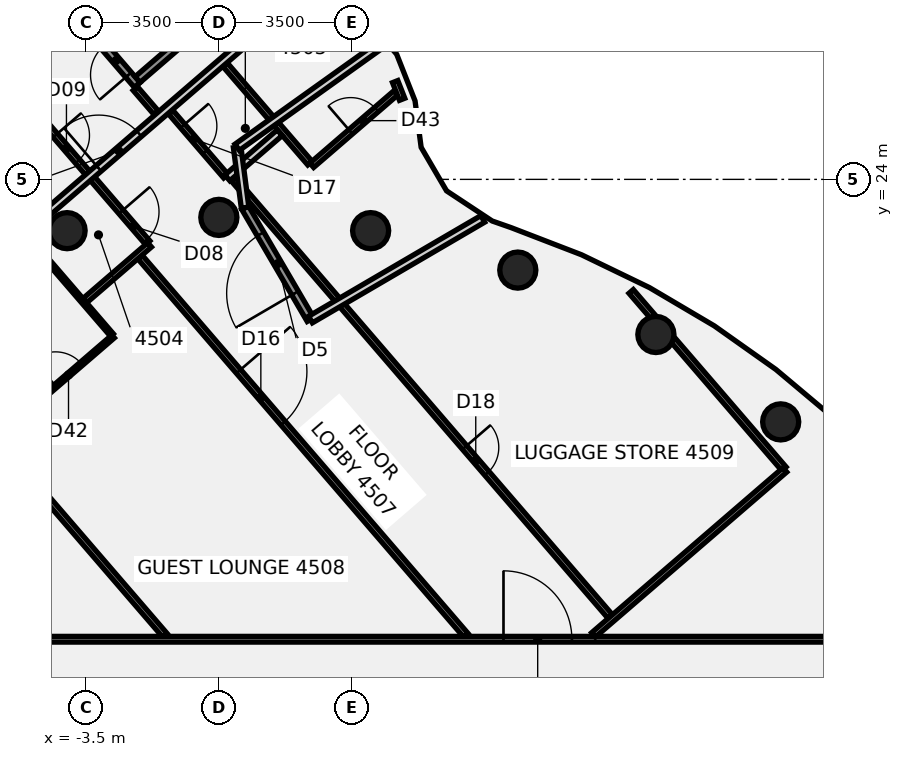
"""IFC4 building model, lengths in metres.
Left out: names, types, materials, properties, quantities, classifications, styles, units other than length and angle.
Written with IfcOpenShell. Run it as: python <this file> out.ifc"""

import sys

from ifc_helpers import new_model, si_unit, direction, frame, frame_2d, origin, origin_2d, place, context, subcontext, project, spatial, rectangle, circle, extrude, element, fill, save


model = new_model("IFC4")
c1 = context("Model", 3, precision=1e-05, world=origin(), true_north=direction((0.0, 1.0)))
c2 = subcontext(c1, "Body", "Model", "MODEL_VIEW")
j1 = project(units=[si_unit("LENGTHUNIT", "METRE"), si_unit("PLANEANGLEUNIT", "RADIAN")], contexts=[c1])
p1 = place(None, origin())
s1 = spatial("IfcSite", under=j1, at=p1, CompositionType="ELEMENT")
p2 = place(p1, origin())
s2 = spatial("IfcBuilding", under=s1, at=p2, CompositionType="ELEMENT")
p3 = place(p2, frame((0.0, 0.0, 182.5)))
s3 = spatial("IfcBuildingStorey", under=s2, at=p3, CompositionType="ELEMENT", Elevation=182.5)
for number, where, z_axis, x_axis in (
    (1, (14.784, 17.619, -0.14), (0.0, 0.0, 1.0), (1.0, 0.0, 0.0)),
    (2, (11.5, 19.919, -0.14), (0.0, 0.0, 1.0), (1.0, 0.0, 0.0)),
    (3, (7.866, 21.613, -0.14), (0.0, 0.0, 1.0), (1.0, 0.0, 0.0)),
    (4, (3.994, 22.651, -0.14), (0.0, 0.0, 1.0), (1.0, 0.0, 0.0)),
    (5, (0.0, 23.0, -0.14), (0.0, 0.0, 1.0), (1.0, 0.0, 0.0)),
    (6, (-3.994, 22.651, -0.14), (0.0, 0.0, 1.0), (1.0, 0.0, 0.0)),
):
    element("IfcColumn", number, at=place(p3, frame(where, z_axis=z_axis, x_axis=x_axis)), inside=s3, PredefinedType="COLUMN", context=c2, shape_type="SweptSolid", body=[
        extrude(circle(Radius=0.475, at=origin_2d()), origin(), (0.0, 0.0, 1.0), 3.6),
    ])
p4 = place(p3, frame((-12.149, 34.262, 0.0), z_axis=(0.0, 0.0, 1.0), x_axis=(0.652651241908, -0.75765846952, 0.0)))
e7 = element("IfcWall", 7, at=p4, inside=s3, PredefinedType="PARTITIONING", context=c2, shape_type="SweptSolid", body=[
    extrude(rectangle(XDim=15.745, YDim=0.15, at=frame_2d((7.873, 0.0))), origin(), (0.0, 0.0, 1.0), 2.864),
])
p5 = place(p4, frame((14.67, 0.0, 0.0)))
e8 = element("IfcOpeningElement", 8, at=p5, cuts=e7, PredefinedType="OPENING", context=c2, shape_type="SweptSolid", body=[
    extrude(rectangle(XDim=1.0, YDim=2.1, at=frame_2d((0.5, 1.05))), frame((0.0, 0.085, 0.0), z_axis=(0.0, -1.0, 0.0), x_axis=(1.0, 0.0, 0.0)), (0.0, 0.0, 1.0), 0.17),
])
p6 = place(p4, frame((12.02, 0.0, 0.0)))
e9 = element("IfcOpeningElement", 9, at=p6, cuts=e7, PredefinedType="OPENING", context=c2, shape_type="SweptSolid", body=[
    extrude(rectangle(XDim=0.9, YDim=2.1, at=frame_2d((0.45, 1.05))), frame((0.0, 0.085, 0.0), z_axis=(0.0, -1.0, 0.0), x_axis=(1.0, 0.0, 0.0)), (0.0, 0.0, 1.0), 0.17),
])
p7 = place(p4, frame((5.32, 0.0, 0.0)))
e10 = element("IfcOpeningElement", 10, at=p7, cuts=e7, PredefinedType="OPENING", context=c2, shape_type="SweptSolid", body=[
    extrude(rectangle(XDim=0.9, YDim=2.1, at=frame_2d((0.45, 1.05))), frame((0.0, 0.085, 0.0), z_axis=(0.0, -1.0, 0.0), x_axis=(1.0, 0.0, 0.0)), (0.0, 0.0, 1.0), 0.17),
])
p8 = place(p4, frame((3.02, 0.0, 0.0)))
e11 = element("IfcOpeningElement", 11, at=p8, cuts=e7, PredefinedType="OPENING", context=c2, shape_type="SweptSolid", body=[
    extrude(rectangle(XDim=0.9, YDim=2.1, at=frame_2d((0.45, 1.05))), frame((0.0, 0.085, 0.0), z_axis=(0.0, -1.0, 0.0), x_axis=(1.0, 0.0, 0.0)), (0.0, 0.0, 1.0), 0.17),
])
p9 = place(p3, frame((-10.868, 22.97, 0.0), z_axis=(0.0, 0.0, 1.0), x_axis=(0.652748053076, -0.757575065063, 0.0)))
e12 = element("IfcWall", 12, at=p9, inside=s3, PredefinedType="PARTITIONING", context=c2, shape_type="SweptSolid", body=[
    extrude(rectangle(XDim=14.472, YDim=0.15, at=frame_2d((7.236, 0.0))), origin(), (0.0, 0.0, 1.0), 2.864),
])
p10 = place(p3, frame((-2.198, 26.39, 0.0), z_axis=(0.0, 0.0, 1.0), x_axis=(0.652726981175, -0.757593220697, 0.0)))
e13 = element("IfcWall", 13, at=p10, inside=s3, PredefinedType="PARTITIONING", context=c2, shape_type="SweptSolid", body=[
    extrude(rectangle(XDim=0.84, YDim=0.15, at=frame_2d((0.42, 0.0))), origin(), (0.0, 0.0, 1.0), 2.864),
])
p11 = place(p3, frame((-5.067, 22.518, 0.0), z_axis=(0.0, 0.0, 1.0), x_axis=(0.652759016161, -0.757565618821, 0.0)))
e14 = element("IfcWall", 14, at=p11, inside=s3, PredefinedType="PARTITIONING", context=c2, shape_type="SweptSolid", body=[
    extrude(rectangle(XDim=3.45, YDim=0.1, at=frame_2d((1.725, 0.0))), origin(), (0.0, 0.0, 1.0), 2.864),
])
p12 = place(p3, frame((-2.074, 21.955, 0.0), z_axis=(0.0, 0.0, 1.0), x_axis=(0.652736603542, -0.757584930154, 0.0)))
e15 = element("IfcWall", 15, at=p12, inside=s3, PredefinedType="PARTITIONING", context=c2, shape_type="SweptSolid", body=[
    extrude(rectangle(XDim=13.133, YDim=0.15, at=frame_2d((6.566, 0.0))), origin(), (0.0, 0.0, 1.0), 2.864),
])
p13 = place(p12, frame((3.97, 0.0, 0.0)))
e16 = element("IfcOpeningElement", 16, at=p13, cuts=e15, PredefinedType="OPENING", context=c2, shape_type="SweptSolid", body=[
    extrude(rectangle(XDim=1.8, YDim=2.1, at=frame_2d((0.9, 1.05))), frame((0.0, 0.085, 0.0), z_axis=(0.0, -1.0, 0.0), x_axis=(1.0, 0.0, 0.0)), (0.0, 0.0, 1.0), 0.17),
])
p14 = place(p3, frame((-1.266, 25.767, 0.0), z_axis=(0.0, 0.0, 1.0), x_axis=(0.652880885414, -0.757460592679, 0.0)))
e17 = element("IfcWall", 17, at=p14, inside=s3, PredefinedType="PARTITIONING", context=c2, shape_type="SweptSolid", body=[
    extrude(rectangle(XDim=2.22, YDim=0.15, at=frame_2d((1.11, 0.0))), origin(), (0.0, 0.0, 1.0), 2.864),
])
p15 = place(p14, frame((0.48, 0.0, 0.0)))
e18 = element("IfcOpeningElement", 18, at=p15, cuts=e17, PredefinedType="OPENING", context=c2, shape_type="SweptSolid", body=[
    extrude(rectangle(XDim=0.9, YDim=2.1, at=frame_2d((0.45, 1.05))), frame((0.0, 0.085, 0.0), z_axis=(0.0, -1.0, 0.0), x_axis=(1.0, 0.0, 0.0)), (0.0, 0.0, 1.0), 0.17),
])
p16 = place(p3, frame((0.173, 27.007, 0.0), z_axis=(0.0, 0.0, 1.0), x_axis=(0.652861605441, -0.757477210311, 0.0)))
e19 = element("IfcWall", 19, at=p16, inside=s3, PredefinedType="PARTITIONING", context=c2, shape_type="SweptSolid", body=[
    extrude(rectangle(XDim=3.405, YDim=0.15, at=frame_2d((1.702, 0.0))), origin(), (0.0, 0.0, 1.0), 2.864),
])
p17 = place(p3, frame((0.376, 24.014, 0.0), z_axis=(0.0, 0.0, 1.0), x_axis=(0.652727037731, -0.75759317197, 0.0)))
e20 = element("IfcWall", 20, at=p17, inside=s3, PredefinedType="PARTITIONING", context=c2, shape_type="SweptSolid", body=[
    extrude(rectangle(XDim=15.2, YDim=0.15, at=frame_2d((7.6, 0.0))), origin(), (0.0, 0.0, 1.0), 2.864),
])
p18 = place(p17, frame((9.33, 0.0, 0.0)))
e21 = element("IfcOpeningElement", 21, at=p18, cuts=e20, PredefinedType="OPENING", context=c2, shape_type="SweptSolid", body=[
    extrude(rectangle(XDim=0.9, YDim=2.1, at=frame_2d((0.45, 1.05))), frame((0.0, 0.085, 0.0), z_axis=(0.0, -1.0, 0.0), x_axis=(1.0, 0.0, 0.0)), (0.0, 0.0, 1.0), 0.17),
])
p19 = place(p3, frame((10.849, 21.052, 0.0), z_axis=(0.0, 0.0, 1.0), x_axis=(0.652545214722, -0.757749789009, 0.0)))
e22 = element("IfcWall", 22, at=p19, inside=s3, PredefinedType="PARTITIONING", context=c2, shape_type="SweptSolid", body=[
    extrude(rectangle(XDim=0.882, YDim=0.15, at=frame_2d((0.441, 0.0))), origin(), (0.0, 0.0, 1.0), 2.864),
])
p20 = place(p3, frame((11.947, 19.777, 0.0), z_axis=(0.0, 0.0, 1.0), x_axis=(0.652683992086, -0.757630257101, 0.0)))
e23 = element("IfcWall", 23, at=p20, inside=s3, PredefinedType="PARTITIONING", context=c2, shape_type="SweptSolid", body=[
    extrude(rectangle(XDim=4.478, YDim=0.15, at=frame_2d((2.239, 0.0))), origin(), (0.0, 0.0, 1.0), 2.864),
])
p21 = place(p3, frame((-17.065, 11.9, 0.0), z_axis=(0.0, 0.0, 1.0), x_axis=(1.0, 0.0, 0.0)))
e24 = element("IfcWall", 24, at=p21, inside=s3, PredefinedType="PARTITIONING", context=c2, shape_type="SweptSolid", body=[
    extrude(rectangle(XDim=34.165, YDim=0.15, at=frame_2d((17.083, 0.0))), origin(), (0.0, 0.0, 1.0), 2.864),
])
p22 = place(p21, frame((24.555, 0.0, 0.0)))
e25 = element("IfcOpeningElement", 25, at=p22, cuts=e24, PredefinedType="OPENING", context=c2, shape_type="SweptSolid", body=[
    extrude(rectangle(XDim=1.8, YDim=2.1, at=frame_2d((0.9, 1.05))), frame((0.0, 0.085, 0.0), z_axis=(0.0, -1.0, 0.0), x_axis=(1.0, 0.0, 0.0)), (0.0, 0.0, 1.0), 0.17),
])
p23 = place(p21, frame((8.542, 0.0, 0.0)))
e26 = element("IfcOpeningElement", 26, at=p23, cuts=e24, PredefinedType="OPENING", context=c2, shape_type="SweptSolid", body=[
    extrude(rectangle(XDim=1.8, YDim=2.1, at=frame_2d((0.9, 1.05))), frame((0.0, 0.085, 0.0), z_axis=(0.0, -1.0, 0.0), x_axis=(1.0, 0.0, 0.0)), (0.0, 0.0, 1.0), 0.17),
])
p24 = place(p21, frame((3.442, 0.0, 0.0)))
e27 = element("IfcOpeningElement", 27, at=p24, cuts=e24, PredefinedType="OPENING", context=c2, shape_type="SweptSolid", body=[
    extrude(rectangle(XDim=1.8, YDim=2.1, at=frame_2d((0.9, 1.05))), frame((0.0, 0.085, 0.0), z_axis=(0.0, -1.0, 0.0), x_axis=(1.0, 0.0, 0.0)), (0.0, 0.0, 1.0), 0.17),
])
p25 = place(p3, frame((-8.177, 19.97, 0.0), z_axis=(0.0, 0.0, 1.0), x_axis=(0.757604641141, 0.652713725704, 0.0)))
e28 = element("IfcWall", 28, at=p25, inside=s3, PredefinedType="PARTITIONING", context=c2, shape_type="SweptSolid", body=[
    extrude(rectangle(XDim=14.219, YDim=0.2, at=frame_2d((7.109, 0.0))), origin(), (0.0, 0.0, 1.0), 2.864),
])
p26 = place(p25, frame((6.621, 0.0, 0.0)))
e29 = element("IfcOpeningElement", 29, at=p26, cuts=e28, PredefinedType="OPENING", context=c2, shape_type="SweptSolid", body=[
    extrude(rectangle(XDim=1.4, YDim=2.1, at=frame_2d((0.7, 1.05))), frame((0.0, 0.11, 0.0), z_axis=(0.0, -1.0, 0.0), x_axis=(1.0, 0.0, 0.0)), (0.0, 0.0, 1.0), 0.22),
])
p27 = place(p3, frame((-5.831, 17.24, 0.0), z_axis=(0.0, 0.0, 1.0), x_axis=(0.757627148994, 0.652687599934, 0.0)))
e30 = element("IfcWall", 30, at=p27, inside=s3, PredefinedType="PARTITIONING", context=c2, shape_type="SweptSolid", body=[
    extrude(rectangle(XDim=4.025, YDim=0.1, at=frame_2d((2.012, 0.0))), origin(), (0.0, 0.0, 1.0), 2.864),
])
p28 = place(p27, frame((2.025, 0.0, 0.0)))
e31 = element("IfcOpeningElement", 31, at=p28, cuts=e30, PredefinedType="OPENING", context=c2, shape_type="SweptSolid", body=[
    extrude(rectangle(XDim=0.9, YDim=2.1, at=frame_2d((0.45, 1.05))), frame((0.0, 0.06, 0.0), z_axis=(0.0, -1.0, 0.0), x_axis=(1.0, 0.0, 0.0)), (0.0, 0.0, 1.0), 0.12),
])
p29 = place(p3, frame((2.445, 24.371, 0.0), z_axis=(0.0, 0.0, 1.0), x_axis=(0.757626487429, 0.652688367865, 0.0)))
e32 = element("IfcWall", 32, at=p29, inside=s3, PredefinedType="PARTITIONING", context=c2, shape_type="SweptSolid", body=[
    extrude(rectangle(XDim=2.922, YDim=0.15, at=frame_2d((1.461, 0.0))), origin(), (0.0, 0.0, 1.0), 2.864),
])
p30 = place(p29, frame((1.35, 0.0, 0.0)))
e33 = element("IfcOpeningElement", 33, at=p30, cuts=e32, PredefinedType="OPENING", context=c2, shape_type="SweptSolid", body=[
    extrude(rectangle(XDim=0.9, YDim=2.1, at=frame_2d((0.45, 1.05))), frame((0.0, 0.085, 0.0), z_axis=(0.0, -1.0, 0.0), x_axis=(1.0, 0.0, 0.0)), (0.0, 0.0, 1.0), 0.17),
])
p31 = place(p3, frame((-3.52, 20.815, 0.0), z_axis=(0.0, 0.0, 1.0), x_axis=(0.757545656349, 0.65278218308, 0.0)))
e34 = element("IfcWall", 34, at=p31, inside=s3, PredefinedType="PARTITIONING", context=c2, shape_type="SweptSolid", body=[
    extrude(rectangle(XDim=2.24, YDim=0.15, at=frame_2d((1.12, 0.0))), origin(), (0.0, 0.0, 1.0), 2.864),
])
p32 = place(p3, frame((0.223, 24.04, 0.0), z_axis=(0.0, 0.0, 1.0), x_axis=(0.757558670656, 0.652767079834, 0.0)))
e35 = element("IfcWall", 35, at=p32, inside=s3, PredefinedType="PARTITIONING", context=c2, shape_type="SweptSolid", body=[
    extrude(rectangle(XDim=1.82, YDim=0.2, at=frame_2d((0.91, 0.0))), origin(), (0.0, 0.0, 1.0), 2.864),
])
p33 = place(p3, frame((9.858, 12.014, 0.0), z_axis=(0.0, 0.0, 1.0), x_axis=(0.757389923931, 0.652962865044, 0.0)))
e36 = element("IfcWall", 36, at=p33, inside=s3, PredefinedType="PARTITIONING", context=c2, shape_type="SweptSolid", body=[
    extrude(rectangle(XDim=6.649, YDim=0.15, at=frame_2d((3.324, 0.0))), origin(), (0.0, 0.0, 1.0), 2.864),
])
p34 = place(p3, frame((4.823, 26.107, 0.0), z_axis=(0.0, 0.0, 1.0), x_axis=(-0.366332317137, 0.930484085528, 0.0)))
e37 = element("IfcWall", 37, at=p34, inside=s3, PredefinedType="PARTITIONING", context=c2, shape_type="SweptSolid", body=[
    extrude(rectangle(XDim=0.5, YDim=0.15, at=frame_2d((0.25, 0.0))), origin(), (0.0, 0.0, 1.0), 2.864),
])
p35 = place(p3, frame((2.411, 20.311, 0.0), z_axis=(0.0, 0.0, 1.0), x_axis=(-0.504400373358, 0.863469897192, 0.0)))
e38 = element("IfcWall", 38, at=p35, inside=s3, PredefinedType="SOLIDWALL", context=c2, shape_type="SweptSolid", body=[
    extrude(rectangle(XDim=3.412, YDim=0.2, at=frame_2d((1.706, 0.0))), origin(), (0.0, 0.0, 1.0), 3.46),
])
p36 = place(p35, frame((0.806, 0.0, 0.0)))
e39 = element("IfcOpeningElement", 39, at=p36, cuts=e38, PredefinedType="OPENING", context=c2, shape_type="SweptSolid", body=[
    extrude(rectangle(XDim=1.8, YDim=2.4, at=frame_2d((0.9, 1.2))), frame((0.0, 0.11, 0.0), z_axis=(0.0, -1.0, 0.0), x_axis=(1.0, 0.0, 0.0)), (0.0, 0.0, 1.0), 0.22),
])
p37 = place(p3, frame((2.411, 20.312, 0.0), z_axis=(0.0, 0.0, 1.0), x_axis=(0.863468462435, 0.504402829472, 0.0)))
e40 = element("IfcWall", 40, at=p37, inside=s3, PredefinedType="SOLIDWALL", context=c2, shape_type="SweptSolid", body=[
    extrude(rectangle(XDim=5.251, YDim=0.2, at=frame_2d((2.625, 0.0))), origin(), (0.0, 0.0, 1.0), 2.964),
])
p38 = place(p3, frame((0.69, 23.257, 0.0), z_axis=(0.0, 0.0, 1.0), x_axis=(-0.130395335876, 0.991462080153, 0.0)))
e41 = element("IfcWall", 41, at=p38, inside=s3, PredefinedType="SOLIDWALL", context=c2, shape_type="SweptSolid", body=[
    extrude(rectangle(XDim=1.601, YDim=0.2, at=frame_2d((0.8, 0.0))), origin(), (0.0, 0.0, 1.0), 3.46),
])
p39 = place(p3, frame((0.482, 24.844, 0.0), z_axis=(0.0, 0.0, 1.0), x_axis=(0.813929369959, 0.580963837702, 0.0)))
e42 = element("IfcWall", 42, at=p39, inside=s3, PredefinedType="SOLIDWALL", context=c2, shape_type="SweptSolid", body=[
    extrude(rectangle(XDim=4.799, YDim=0.2, at=frame_2d((2.399, 0.0))), origin(), (0.0, 0.0, 1.0), 3.46),
])
p40 = place(p3, frame((-2.148, 26.485, -0.14), z_axis=(0.0, 0.0, 1.0), x_axis=(-0.6527428112, 0.75757958158, 0.0)))
e43 = element("IfcWall", 43, at=p40, inside=s3, PredefinedType="SHEAR", context=c2, shape_type="SweptSolid", body=[
    extrude(rectangle(XDim=6.7, YDim=0.2, at=frame_2d((3.35, 0.0))), origin(), (0.0, 0.0, 1.0), 3.004),
])
p41 = place(p40, frame((0.35, 0.0, 0.0)))
e44 = element("IfcOpeningElement", 44, at=p41, cuts=e43, PredefinedType="OPENING", context=c2, shape_type="SweptSolid", body=[
    extrude(rectangle(XDim=1.0, YDim=2.1, at=frame_2d((0.5, 1.05))), frame((0.0, 0.11, 0.0), z_axis=(0.0, -1.0, 0.0), x_axis=(1.0, 0.0, 0.0)), (0.0, 0.0, 1.0), 0.22),
])
p42 = place(p3, frame((0.287, 28.715, -0.14), z_axis=(0.0, 0.0, 1.0), x_axis=(-0.757611592596, -0.652705657065, 0.0)))
e45 = element("IfcWall", 45, at=p42, inside=s3, PredefinedType="SHEAR", context=c2, shape_type="SweptSolid", body=[
    extrude(rectangle(XDim=3.2, YDim=0.2, at=frame_2d((1.6, 0.0))), origin(), (0.0, 0.0, 1.0), 3.004),
])
p43 = place(p5, frame((1.0, 0.0, 0.0), z_axis=(0.0, 0.0, 1.0), x_axis=(-1.0, 0.0, 0.0)))
e46 = element("IfcDoor", 46, at=p43, inside=s3, OperationType="SINGLE_SWING_RIGHT", PredefinedType="DOOR", context=c2, shape_type="SweptSolid", body=[
    extrude(rectangle(XDim=1.0, YDim=2.1, at=frame_2d((0.5, 1.05))), frame((0.0, 0.025, 0.0), z_axis=(0.0, -1.0, 0.0), x_axis=(1.0, 0.0, 0.0)), (0.0, 0.0, 1.0), 0.05),
])
fill(e8, e46)
p44 = place(p6, frame((0.9, 0.0, 0.0), z_axis=(0.0, 0.0, 1.0), x_axis=(-1.0, 0.0, 0.0)))
e47 = element("IfcDoor", 47, at=p44, inside=s3, OperationType="SINGLE_SWING_RIGHT", PredefinedType="DOOR", context=c2, shape_type="SweptSolid", body=[
    extrude(rectangle(XDim=0.9, YDim=2.1, at=frame_2d((0.45, 1.05))), frame((0.0, 0.025, 0.0), z_axis=(0.0, -1.0, 0.0), x_axis=(1.0, 0.0, 0.0)), (0.0, 0.0, 1.0), 0.05),
])
fill(e9, e47)
p45 = place(p13, frame((1.8, 0.0, 0.0), z_axis=(0.0, 0.0, 1.0), x_axis=(-1.0, 0.0, 0.0)))
e48 = element("IfcDoor", 48, at=p45, inside=s3, OperationType="DOUBLE_DOOR_SINGLE_SWING", PredefinedType="DOOR", context=c2, shape_type="SweptSolid", body=[
    extrude(rectangle(XDim=1.8, YDim=2.1, at=frame_2d((0.9, 1.05))), frame((0.0, 0.025, 0.0), z_axis=(0.0, -1.0, 0.0), x_axis=(1.0, 0.0, 0.0)), (0.0, 0.0, 1.0), 0.05),
])
fill(e16, e48)
p46 = place(p15, origin())
e49 = element("IfcDoor", 49, at=p46, inside=s3, OperationType="SINGLE_SWING_RIGHT", PredefinedType="DOOR", context=c2, shape_type="SweptSolid", body=[
    extrude(rectangle(XDim=0.9, YDim=2.1, at=frame_2d((0.45, 1.05))), frame((0.0, 0.025, 0.0), z_axis=(0.0, -1.0, 0.0), x_axis=(1.0, 0.0, 0.0)), (0.0, 0.0, 1.0), 0.05),
])
fill(e18, e49)
p47 = place(p18, origin())
e50 = element("IfcDoor", 50, at=p47, inside=s3, OperationType="SINGLE_SWING_LEFT", PredefinedType="DOOR", context=c2, shape_type="SweptSolid", body=[
    extrude(rectangle(XDim=0.9, YDim=2.1, at=frame_2d((0.45, 1.05))), frame((0.0, 0.025, 0.0), z_axis=(0.0, -1.0, 0.0), x_axis=(1.0, 0.0, 0.0)), (0.0, 0.0, 1.0), 0.05),
])
fill(e21, e50)
p48 = place(p22, frame((1.8, 0.0, 0.0), z_axis=(0.0, 0.0, 1.0), x_axis=(-1.0, 0.0, 0.0)))
e51 = element("IfcDoor", 51, at=p48, inside=s3, OperationType="DOUBLE_DOOR_SINGLE_SWING", PredefinedType="DOOR", context=c2, shape_type="SweptSolid", body=[
    extrude(rectangle(XDim=1.8, YDim=2.1, at=frame_2d((0.9, 1.05))), frame((0.0, 0.025, 0.0), z_axis=(0.0, -1.0, 0.0), x_axis=(1.0, 0.0, 0.0)), (0.0, 0.0, 1.0), 0.05),
])
fill(e25, e51)
p49 = place(p26, frame((1.4, 0.0, 0.0), z_axis=(0.0, 0.0, 1.0), x_axis=(-1.0, 0.0, 0.0)))
e52 = element("IfcDoor", 52, at=p49, inside=s3, OperationType="DOUBLE_DOOR_SINGLE_SWING", PredefinedType="DOOR", context=c2, shape_type="SweptSolid", body=[
    extrude(rectangle(XDim=1.4, YDim=2.1, at=frame_2d((0.7, 1.05))), frame((0.0, 0.025, 0.0), z_axis=(0.0, -1.0, 0.0), x_axis=(1.0, 0.0, 0.0)), (0.0, 0.0, 1.0), 0.05),
])
fill(e29, e52)
p50 = place(p28, origin())
e53 = element("IfcDoor", 53, at=p50, inside=s3, OperationType="SINGLE_SWING_LEFT", PredefinedType="DOOR", context=c2, shape_type="SweptSolid", body=[
    extrude(rectangle(XDim=0.9, YDim=2.1, at=frame_2d((0.45, 1.05))), frame((0.0, 0.025, 0.0), z_axis=(0.0, -1.0, 0.0), x_axis=(1.0, 0.0, 0.0)), (0.0, 0.0, 1.0), 0.05),
])
fill(e31, e53)
p51 = place(p30, origin())
e54 = element("IfcDoor", 54, at=p51, inside=s3, OperationType="SINGLE_SWING_LEFT", PredefinedType="DOOR", context=c2, shape_type="SweptSolid", body=[
    extrude(rectangle(XDim=0.9, YDim=2.1, at=frame_2d((0.45, 1.05))), frame((0.0, 0.025, 0.0), z_axis=(0.0, -1.0, 0.0), x_axis=(1.0, 0.0, 0.0)), (0.0, 0.0, 1.0), 0.05),
])
fill(e33, e54)
p52 = place(p36, origin())
e55 = element("IfcDoor", 55, at=p52, inside=s3, OperationType="SINGLE_SWING_LEFT", PredefinedType="DOOR", context=c2, shape_type="SweptSolid", body=[
    extrude(rectangle(XDim=1.8, YDim=2.4, at=frame_2d((0.9, 1.2))), frame((0.0, 0.025, 0.0), z_axis=(0.0, -1.0, 0.0), x_axis=(1.0, 0.0, 0.0)), (0.0, 0.0, 1.0), 0.05),
])
fill(e39, e55)
p53 = place(p41, origin())
e56 = element("IfcDoor", 56, at=p53, inside=s3, OperationType="SINGLE_SWING_LEFT", PredefinedType="DOOR", context=c2, shape_type="SweptSolid", body=[
    extrude(rectangle(XDim=1.0, YDim=2.1, at=frame_2d((0.5, 1.05))), frame((0.0, 0.025, 0.0), z_axis=(0.0, -1.0, 0.0), x_axis=(1.0, 0.0, 0.0)), (0.0, 0.0, 1.0), 0.05),
])
fill(e44, e56)
save(model, sys.argv[1])
